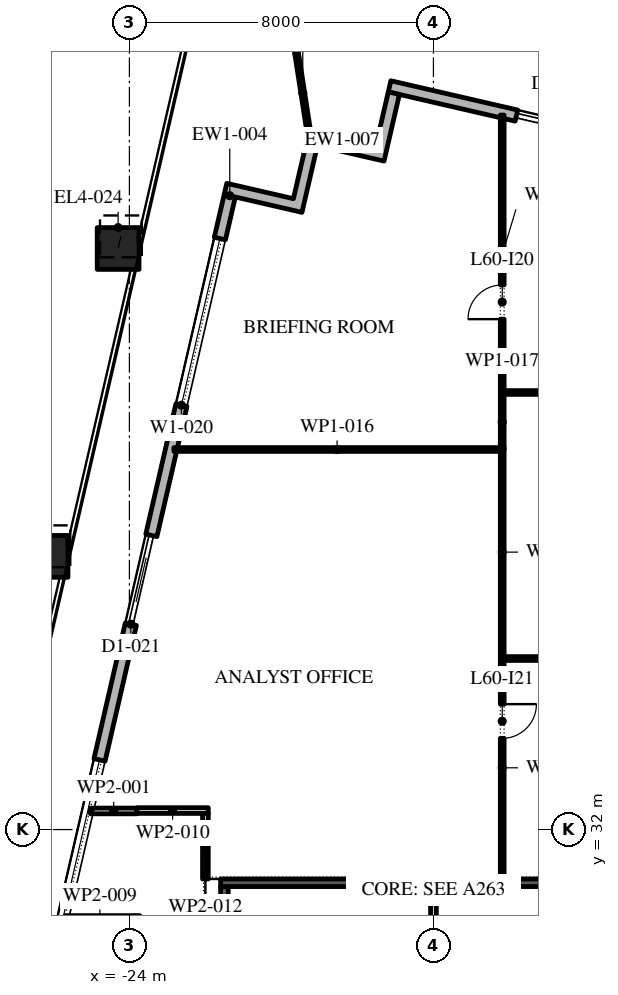
"""IFC4 building model, lengths in metres.
Left out: names, types, materials, properties, quantities, classifications, styles, units other than length and angle.
Written with IfcOpenShell. Run it as: python <this file> out.ifc"""

import sys

from ifc_helpers import new_model, si_unit, direction, frame, frame_2d, origin, origin_2d, place, context, subcontext, project, spatial, polyline, rectangle, outline, extrude, element, fill, save


model = new_model("IFC4")
c1 = context("Model", 3, precision=1e-05, world=origin(), true_north=direction((0.0, 1.0)))
c2 = subcontext(c1, "Body", "Model", "MODEL_VIEW")
j1 = project(units=[si_unit("LENGTHUNIT", "METRE"), si_unit("PLANEANGLEUNIT", "RADIAN")], contexts=[c1])
p1 = place(None, origin())
s1 = spatial("IfcSite", under=j1, at=p1, CompositionType="ELEMENT")
p2 = place(p1, origin())
s2 = spatial("IfcBuilding", under=s1, at=p2, CompositionType="ELEMENT")
p3 = place(p2, frame((0.0, 0.0, 276.6)))
s3 = spatial("IfcBuildingStorey", under=s2, at=p3, CompositionType="ELEMENT", Elevation=276.6)
p4 = place(p3, frame((-24.297, 47.289, 0.0), z_axis=(0.017502025619, 0.075687567741, 0.996977969259), x_axis=(-0.974290512438, 0.225295355862, 0.0)))
e1 = element("IfcColumn", 1, at=p4, inside=s3, PredefinedType="COLUMN", context=c2, shape_type="SweptSolid", body=[
    extrude(rectangle(XDim=1.1, YDim=1.1, at=origin_2d()), origin(), (0.0, 0.0, 1.0), 4.213),
])
p5 = place(p3, frame((-26.167, 39.188, 0.0), z_axis=(0.014617836866, 0.063111930596, 0.997899395261), x_axis=(-0.974209784844, 0.225644178107, 0.0)))
e2 = element("IfcColumn", 2, at=p5, inside=s3, PredefinedType="COLUMN", context=c2, shape_type="SweptSolid", body=[
    extrude(rectangle(XDim=1.1, YDim=1.1, at=origin_2d()), origin(), (0.0, 0.0, 1.0), 4.209),
])
p6 = place(p3, frame((29.616, 40.758, 0.0), z_axis=(0.0, 0.0, 1.0), x_axis=(-0.974370532314, 0.224949029246, 0.0)))
e3 = element("IfcWall", 3, at=p6, inside=s3, PredefinedType="STANDARD", context=c2, shape_type="SweptSolid", body=[
    extrude(rectangle(XDim=48.0, YDim=0.3, at=frame_2d((24.0, 0.0))), origin(), (0.0, 0.0, 1.0), 4.0),
])
p7 = place(p6, frame((1.625, 0.0, 0.45)))
e4 = element("IfcOpeningElement", 4, at=p7, cuts=e3, PredefinedType="OPENING", context=c2, shape_type="SweptSolid", body=[
    extrude(rectangle(XDim=4.5, YDim=2.575, at=frame_2d((2.25, 1.288))), frame((0.0, 0.16, 0.0), z_axis=(0.0, -1.0, 0.0), x_axis=(1.0, 0.0, 0.0)), (0.0, 0.0, 1.0), 0.32),
])
p8 = place(p6, frame((10.575, 0.0, 0.0)))
e5 = element("IfcOpeningElement", 5, at=p8, cuts=e3, PredefinedType="OPENING", context=c2, shape_type="SweptSolid", body=[
    extrude(rectangle(XDim=2.4, YDim=3.5, at=frame_2d((1.2, 1.75))), frame((0.0, 0.16, 0.0), z_axis=(0.0, -1.0, 0.0), x_axis=(1.0, 0.0, 0.0)), (0.0, 0.0, 1.0), 0.32),
])
p9 = place(p6, frame((17.575, 0.0, 0.45)))
e6 = element("IfcOpeningElement", 6, at=p9, cuts=e3, PredefinedType="OPENING", context=c2, shape_type="SweptSolid", body=[
    extrude(rectangle(XDim=4.5, YDim=2.45, at=frame_2d((2.25, 1.225))), frame((0.0, 0.16, 0.0), z_axis=(0.0, -1.0, 0.0), x_axis=(1.0, 0.0, 0.0)), (0.0, 0.0, 1.0), 0.32),
])
p10 = place(p6, frame((25.625, 0.0, 0.45)))
e7 = element("IfcOpeningElement", 7, at=p10, cuts=e3, PredefinedType="OPENING", context=c2, shape_type="SweptSolid", body=[
    extrude(rectangle(XDim=4.5, YDim=2.45, at=frame_2d((2.25, 1.225))), frame((0.0, 0.16, 0.0), z_axis=(0.0, -1.0, 0.0), x_axis=(1.0, 0.0, 0.0)), (0.0, 0.0, 1.0), 0.32),
])
p11 = place(p6, frame((33.675, 0.0, 0.45)))
e8 = element("IfcOpeningElement", 8, at=p11, cuts=e3, PredefinedType="OPENING", context=c2, shape_type="SweptSolid", body=[
    extrude(rectangle(XDim=4.5, YDim=2.45, at=frame_2d((2.25, 1.225))), frame((0.0, 0.16, 0.0), z_axis=(0.0, -1.0, 0.0), x_axis=(1.0, 0.0, 0.0)), (0.0, 0.0, 1.0), 0.32),
])
p12 = place(p6, frame((42.175, 0.0, 0.0)))
e9 = element("IfcOpeningElement", 9, at=p12, cuts=e3, PredefinedType="OPENING", context=c2, shape_type="SweptSolid", body=[
    extrude(rectangle(XDim=2.4, YDim=3.5, at=frame_2d((1.2, 1.75))), frame((0.0, 0.16, 0.0), z_axis=(0.0, -1.0, 0.0), x_axis=(1.0, 0.0, 0.0)), (0.0, 0.0, 1.0), 0.32),
])
p13 = place(p3, frame((-21.359, 48.678, 0.0), z_axis=(0.0, 0.0, 1.0), x_axis=(-0.224949198343, -0.974370493275, 0.0)))
e10 = element("IfcWall", 10, at=p13, inside=s3, PredefinedType="STANDARD", context=c2, shape_type="SweptSolid", body=[
    extrude(rectangle(XDim=49.5, YDim=0.3, at=frame_2d((24.75, 0.0))), origin(), (0.0, 0.0, 1.0), 4.0),
])
p14 = place(p13, frame((1.157, 0.0, 0.45)))
e11 = element("IfcOpeningElement", 11, at=p14, cuts=e10, PredefinedType="OPENING", context=c2, shape_type="SweptSolid", body=[
    extrude(rectangle(XDim=4.5, YDim=3.05, at=frame_2d((2.25, 1.525))), frame((0.0, 0.16, 0.0), z_axis=(0.0, -1.0, 0.0), x_axis=(1.0, 0.0, 0.0)), (0.0, 0.0, 1.0), 0.32),
])
p15 = place(p13, frame((9.171, 0.0, 0.0)))
e12 = element("IfcOpeningElement", 12, at=p15, cuts=e10, PredefinedType="OPENING", context=c2, shape_type="SweptSolid", body=[
    extrude(rectangle(XDim=2.4, YDim=3.5, at=frame_2d((1.2, 1.75))), frame((0.0, 0.16, 0.0), z_axis=(0.0, -1.0, 0.0), x_axis=(1.0, 0.0, 0.0)), (0.0, 0.0, 1.0), 0.32),
])
p16 = place(p13, frame((15.236, 0.0, 0.45)))
e13 = element("IfcOpeningElement", 13, at=p16, cuts=e10, PredefinedType="OPENING", context=c2, shape_type="SweptSolid", body=[
    extrude(rectangle(XDim=4.5, YDim=3.05, at=frame_2d((2.25, 1.525))), frame((0.0, 0.16, 0.0), z_axis=(0.0, -1.0, 0.0), x_axis=(1.0, 0.0, 0.0)), (0.0, 0.0, 1.0), 0.32),
])
p17 = place(p13, frame((22.35, 0.0, 0.45)))
e14 = element("IfcOpeningElement", 14, at=p17, cuts=e10, PredefinedType="OPENING", context=c2, shape_type="SweptSolid", body=[
    extrude(rectangle(XDim=4.5, YDim=3.05, at=frame_2d((2.25, 1.525))), frame((0.0, 0.16, 0.0), z_axis=(0.0, -1.0, 0.0), x_axis=(1.0, 0.0, 0.0)), (0.0, 0.0, 1.0), 0.32),
])
p18 = place(p13, frame((29.464, 0.0, 0.45)))
e15 = element("IfcOpeningElement", 15, at=p18, cuts=e10, PredefinedType="OPENING", context=c2, shape_type="SweptSolid", body=[
    extrude(rectangle(XDim=4.5, YDim=3.05, at=frame_2d((2.25, 1.525))), frame((0.0, 0.16, 0.0), z_axis=(0.0, -1.0, 0.0), x_axis=(1.0, 0.0, 0.0)), (0.0, 0.0, 1.0), 0.32),
])
p19 = place(p13, frame((37.628, 0.0, 0.0)))
e16 = element("IfcOpeningElement", 16, at=p19, cuts=e10, PredefinedType="OPENING", context=c2, shape_type="SweptSolid", body=[
    extrude(rectangle(XDim=2.4, YDim=3.325, at=frame_2d((1.2, 1.663))), frame((0.0, 0.16, 0.0), z_axis=(0.0, -1.0, 0.0), x_axis=(1.0, 0.0, 0.0)), (0.0, 0.0, 1.0), 0.32),
])
p20 = place(p13, frame((43.693, 0.0, 0.45)))
e17 = element("IfcOpeningElement", 17, at=p20, cuts=e10, PredefinedType="OPENING", context=c2, shape_type="SweptSolid", body=[
    extrude(rectangle(XDim=4.5, YDim=2.825, at=frame_2d((2.25, 1.413))), frame((0.0, 0.16, 0.0), z_axis=(0.0, -1.0, 0.0), x_axis=(1.0, 0.0, 0.0)), (0.0, 0.0, 1.0), 0.32),
])
p21 = place(p3, origin())
e18 = element("IfcWall", 18, at=p21, inside=s3, PredefinedType="STANDARD", context=c2, shape_type="SweptSolid", body=[
    extrude(outline(polyline([(-21.505, 48.712), (-21.438, 49.004), (-19.684, 48.599), (-19.279, 50.353), (-17.525, 49.948), (-17.188, 51.41), (-16.895, 51.342), (-17.3, 49.588), (-19.054, 49.993), (-19.459, 48.24), (-21.505, 48.712)])), origin(), (0.0, 0.0, 1.0), 4.0),
])
p22 = place(p3, frame((-19.279, 50.353, -0.05), z_axis=(0.0, 0.0, 1.0), x_axis=(-0.152949377395, 0.988234024892, 0.0)))
e19 = element("IfcWall", 19, at=p22, inside=s3, PredefinedType="STANDARD", context=c2, shape_type="SweptSolid", body=[
    extrude(rectangle(XDim=2.077, YDim=0.1, at=frame_2d((1.038, 0.0))), origin(), (0.0, 0.0, 1.0), 4.05),
])
p23 = place(p3, frame((-21.5, 25.75, 0.0), z_axis=(0.0, 0.0, 1.0), x_axis=(0.0, 1.0, 0.0)))
e20 = element("IfcWall", 20, at=p23, inside=s3, PredefinedType="SHEAR", context=c2, shape_type="SweptSolid", body=[
    extrude(rectangle(XDim=4.75, YDim=0.2, at=frame_2d((2.375, 0.0))), origin(), (0.0, 0.0, 1.0), 4.0),
])
p24 = place(p23, frame((1.925, 0.0, 0.0)))
e21 = element("IfcOpeningElement", 21, at=p24, cuts=e20, PredefinedType="OPENING", context=c2, shape_type="SweptSolid", body=[
    extrude(rectangle(XDim=0.9, YDim=2.1, at=frame_2d((0.45, 1.05))), frame((0.0, 0.11, 0.0), z_axis=(0.0, -1.0, 0.0), x_axis=(1.0, 0.0, 0.0)), (0.0, 0.0, 1.0), 0.22),
])
p25 = place(p3, frame((-21.6, 30.6, 0.0), z_axis=(0.0, 0.0, 1.0), x_axis=(1.0, 0.0, 0.0)))
e22 = element("IfcWall", 22, at=p25, inside=s3, PredefinedType="SHEAR", context=c2, shape_type="SweptSolid", body=[
    extrude(rectangle(XDim=11.2, YDim=0.2, at=frame_2d((5.6, 0.0))), origin(), (0.0, 0.0, 1.0), 4.0),
])
p26 = place(p3, frame((-16.0, 25.75, 0.0), z_axis=(0.0, 0.0, 1.0), x_axis=(0.0, 1.0, 0.0)))
e23 = element("IfcWall", 23, at=p26, inside=s3, PredefinedType="PARTITIONING", context=c2, shape_type="SweptSolid", body=[
    extrude(rectangle(XDim=4.75, YDim=0.15, at=frame_2d((2.375, 0.0))), origin(), (0.0, 0.0, 1.0), 4.0),
])
p27 = place(p3, frame((-25.025, 32.49, 0.0), z_axis=(0.0, 0.0, 1.0), x_axis=(1.0, 0.0, 0.0)))
e24 = element("IfcWall", 24, at=p27, inside=s3, PredefinedType="PARTITIONING", context=c2, shape_type="SweptSolid", body=[
    extrude(rectangle(XDim=1.225, YDim=0.15, at=frame_2d((0.612, 0.0))), origin(), (0.0, 0.0, 1.0), 4.0),
])
p28 = place(p3, frame((-23.8, 32.5, 0.0), z_axis=(0.0, 0.0, 1.0), x_axis=(1.0, 0.0, 0.0)))
e25 = element("IfcWall", 25, at=p28, inside=s3, PredefinedType="PARTITIONING", context=c2, shape_type="SweptSolid", body=[
    extrude(rectangle(XDim=1.875, YDim=0.15, at=frame_2d((0.938, 0.0))), origin(), (0.0, 0.0, 1.0), 4.0),
])
p29 = place(p3, frame((-22.0, 32.425, 0.0), z_axis=(0.0, 0.0, 1.0), x_axis=(0.0, -1.0, 0.0)))
e26 = element("IfcWall", 26, at=p29, inside=s3, PredefinedType="PARTITIONING", context=c2, shape_type="SweptSolid", body=[
    extrude(rectangle(XDim=1.725, YDim=0.15, at=frame_2d((0.863, 0.0))), origin(), (0.0, 0.0, 1.0), 4.0),
])
p30 = place(p3, frame((-14.19, 30.7, 0.0), z_axis=(0.0, 0.0, 1.0), x_axis=(0.0, 1.0, 0.0)))
e27 = element("IfcWall", 27, at=p30, inside=s3, PredefinedType="PARTITIONING", context=c2, shape_type="SweptSolid", body=[
    extrude(rectangle(XDim=5.85, YDim=0.1, at=frame_2d((2.925, 0.0))), origin(), (0.0, 0.0, 1.0), 4.0),
])
p31 = place(p30, frame((3.7, 0.0, 0.0)))
e28 = element("IfcOpeningElement", 28, at=p31, cuts=e27, PredefinedType="OPENING", context=c2, shape_type="SweptSolid", body=[
    extrude(rectangle(XDim=0.9, YDim=2.1, at=frame_2d((0.45, 1.05))), frame((0.0, 0.06, 0.0), z_axis=(0.0, -1.0, 0.0), x_axis=(1.0, 0.0, 0.0)), (0.0, 0.0, 1.0), 0.12),
])
p32 = place(p3, frame((-14.19, 36.55, 0.0), z_axis=(0.0, 0.0, 1.0), x_axis=(0.0, 1.0, 0.0)))
e29 = element("IfcWall", 29, at=p32, inside=s3, PredefinedType="PARTITIONING", context=c2, shape_type="SweptSolid", body=[
    extrude(rectangle(XDim=5.5, YDim=0.1, at=frame_2d((2.75, 0.0))), origin(), (0.0, 0.0, 1.0), 4.0),
])
p33 = place(p3, frame((-14.14, 36.5, 0.0), z_axis=(0.0, 0.0, 1.0), x_axis=(1.0, 0.0, 0.0)))
e30 = element("IfcWall", 30, at=p33, inside=s3, PredefinedType="PARTITIONING", context=c2, shape_type="SweptSolid", body=[
    extrude(rectangle(XDim=8.19, YDim=0.1, at=frame_2d((4.095, 0.0))), origin(), (0.0, 0.0, 1.0), 4.0),
])
p34 = place(p33, frame((2.79, 0.0, 0.0)))
e31 = element("IfcOpeningElement", 31, at=p34, cuts=e30, PredefinedType="OPENING", context=c2, shape_type="SweptSolid", body=[
    extrude(rectangle(XDim=0.9, YDim=2.1, at=frame_2d((0.45, 1.05))), frame((0.0, 0.06, 0.0), z_axis=(0.0, -1.0, 0.0), x_axis=(1.0, 0.0, 0.0)), (0.0, 0.0, 1.0), 0.12),
])
p35 = place(p3, frame((-14.24, 42.0, 0.0), z_axis=(0.0, 0.0, 1.0), x_axis=(-1.0, 0.0, 0.0)))
e32 = element("IfcWall", 32, at=p35, inside=s3, PredefinedType="PARTITIONING", context=c2, shape_type="SweptSolid", body=[
    extrude(rectangle(XDim=8.589, YDim=0.1, at=frame_2d((4.294, 0.0))), origin(), (0.0, 0.0, 1.0), 4.0),
])
p36 = place(p3, frame((-14.19, 42.0, 0.0), z_axis=(0.0, 0.0, 1.0), x_axis=(0.0, 1.0, 0.0)))
e33 = element("IfcWall", 33, at=p36, inside=s3, PredefinedType="PARTITIONING", context=c2, shape_type="SweptSolid", body=[
    extrude(rectangle(XDim=1.45, YDim=0.1, at=frame_2d((0.725, 0.0))), origin(), (0.0, 0.0, 1.0), 4.0),
])
p37 = place(p3, frame((-14.19, 43.45, 0.0), z_axis=(0.0, 0.0, 1.0), x_axis=(0.0, 1.0, 0.0)))
e34 = element("IfcWall", 34, at=p37, inside=s3, PredefinedType="PARTITIONING", context=c2, shape_type="SweptSolid", body=[
    extrude(rectangle(XDim=7.35, YDim=0.1, at=frame_2d((3.675, 0.0))), origin(), (0.0, 0.0, 1.0), 4.0),
])
p38 = place(p37, frame((1.98, 0.0, 0.0)))
e35 = element("IfcOpeningElement", 35, at=p38, cuts=e34, PredefinedType="OPENING", context=c2, shape_type="SweptSolid", body=[
    extrude(rectangle(XDim=0.9, YDim=2.1, at=frame_2d((0.45, 1.05))), frame((0.0, 0.06, 0.0), z_axis=(0.0, -1.0, 0.0), x_axis=(1.0, 0.0, 0.0)), (0.0, 0.0, 1.0), 0.12),
])
p39 = place(p3, frame((-14.14, 43.5, 0.0), z_axis=(0.0, 0.0, 1.0), x_axis=(1.0, 0.0, 0.0)))
e36 = element("IfcWall", 36, at=p39, inside=s3, PredefinedType="PARTITIONING", context=c2, shape_type="SweptSolid", body=[
    extrude(rectangle(XDim=8.19, YDim=0.1, at=frame_2d((4.095, 0.0))), origin(), (0.0, 0.0, 1.0), 4.0),
])
p40 = place(p3, frame((-19.596, 52.406, -0.05), z_axis=(0.0, 0.0, 1.0), x_axis=(-0.153042446465, 0.988219616067, 0.0)))
e37 = element("IfcWall", 37, at=p40, inside=s3, PredefinedType="STANDARD", context=c2, shape_type="SweptSolid", body=[
    extrude(rectangle(XDim=2.607, YDim=0.1, at=frame_2d((1.303, 0.0))), origin(), (0.0, 0.0, 1.0), 3.07),
])
p41 = place(p12, origin())
e38 = element("IfcDoor", 38, at=p41, inside=s3, OperationType="DOUBLE_DOOR_SLIDING", PredefinedType="DOOR", context=c2, shape_type="SweptSolid", body=[
    extrude(rectangle(XDim=2.4, YDim=3.5, at=frame_2d((1.2, 1.75))), frame((0.0, 0.025, 0.0), z_axis=(0.0, -1.0, 0.0), x_axis=(1.0, 0.0, 0.0)), (0.0, 0.0, 1.0), 0.05),
])
fill(e9, e38)
p42 = place(p14, origin())
e39 = element("IfcWindow", 39, at=p42, inside=s3, PartitioningType="DOUBLE_PANEL_VERTICAL", PredefinedType="WINDOW", context=c2, shape_type="SweptSolid", body=[
    extrude(rectangle(XDim=4.5, YDim=3.05, at=frame_2d((2.25, 1.525))), frame((0.0, 0.03, 0.0), z_axis=(0.0, -1.0, 0.0), x_axis=(1.0, 0.0, 0.0)), (0.0, 0.0, 1.0), 0.06),
])
fill(e11, e39)
p43 = place(p15, origin())
e40 = element("IfcDoor", 40, at=p43, inside=s3, OperationType="DOUBLE_DOOR_SLIDING", PredefinedType="DOOR", context=c2, shape_type="SweptSolid", body=[
    extrude(rectangle(XDim=2.4, YDim=3.5, at=frame_2d((1.2, 1.75))), frame((0.0, 0.025, 0.0), z_axis=(0.0, -1.0, 0.0), x_axis=(1.0, 0.0, 0.0)), (0.0, 0.0, 1.0), 0.05),
])
fill(e12, e40)
p44 = place(p16, origin())
e41 = element("IfcWindow", 41, at=p44, inside=s3, PartitioningType="DOUBLE_PANEL_VERTICAL", PredefinedType="WINDOW", context=c2, shape_type="SweptSolid", body=[
    extrude(rectangle(XDim=4.5, YDim=3.05, at=frame_2d((2.25, 1.525))), frame((0.0, 0.03, 0.0), z_axis=(0.0, -1.0, 0.0), x_axis=(1.0, 0.0, 0.0)), (0.0, 0.0, 1.0), 0.06),
])
fill(e13, e41)
p45 = place(p38, origin())
e42 = element("IfcDoor", 42, at=p45, inside=s3, OperationType="SINGLE_SWING_RIGHT", PredefinedType="DOOR", context=c2, shape_type="SweptSolid", body=[
    extrude(rectangle(XDim=0.9, YDim=2.1, at=frame_2d((0.45, 1.05))), frame((0.0, 0.025, 0.0), z_axis=(0.0, -1.0, 0.0), x_axis=(1.0, 0.0, 0.0)), (0.0, 0.0, 1.0), 0.05),
])
fill(e35, e42)
p46 = place(p31, frame((0.9, 0.0, 0.0), z_axis=(0.0, 0.0, 1.0), x_axis=(-1.0, 0.0, 0.0)))
e43 = element("IfcDoor", 43, at=p46, inside=s3, OperationType="SINGLE_SWING_RIGHT", PredefinedType="DOOR", context=c2, shape_type="SweptSolid", body=[
    extrude(rectangle(XDim=0.9, YDim=2.1, at=frame_2d((0.45, 1.05))), frame((0.0, 0.025, 0.0), z_axis=(0.0, -1.0, 0.0), x_axis=(1.0, 0.0, 0.0)), (0.0, 0.0, 1.0), 0.05),
])
fill(e28, e43)
save(model, sys.argv[1])
